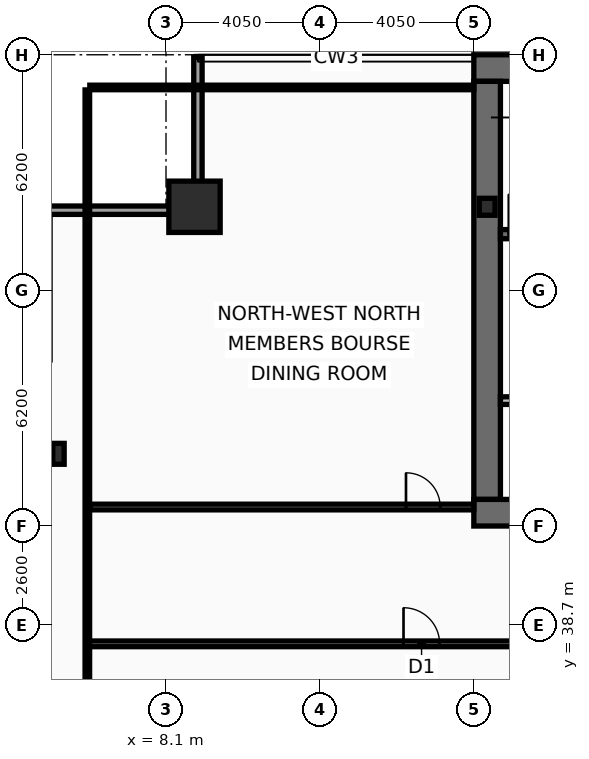
"""IFC4 building model, lengths in metres.
Left out: names, types, materials, properties, quantities, classifications, styles, units other than length and angle.
Written with IfcOpenShell. Run it as: python <this file> out.ifc"""

import sys

from ifc_helpers import new_model, si_unit, direction, frame, frame_2d, origin, origin_2d, place, context, subcontext, project, spatial, rectangle, hollow_rectangle, i_section, extrude, element, fill, save


model = new_model("IFC4")
c1 = context("Model", 3, precision=1e-05, world=origin(), true_north=direction((0.0, 1.0)))
c2 = subcontext(c1, "Body", "Model", "MODEL_VIEW")
j1 = project(units=[si_unit("LENGTHUNIT", "METRE"), si_unit("PLANEANGLEUNIT", "RADIAN")], contexts=[c1])
p1 = place(None, origin())
s1 = spatial("IfcSite", under=j1, at=p1, CompositionType="ELEMENT")
p2 = place(p1, origin())
s2 = spatial("IfcBuilding", under=s1, at=p2, CompositionType="ELEMENT")
p3 = place(p2, frame((0.0, 0.0, 168.6)))
s3 = spatial("IfcBuildingStorey", under=s2, at=p3, CompositionType="ELEMENT", Elevation=168.6)
p4 = place(p3, frame((16.2, 53.35, 0.0), z_axis=(0.0, 0.0, 1.0), x_axis=(1.0, 0.0, 0.0)))
e1 = element("IfcWall", 1, at=p4, inside=s3, PredefinedType="SHEAR", context=c2, shape_type="SweptSolid", body=[
    extrude(rectangle(XDim=40.5, YDim=0.7, at=frame_2d((20.25, 0.0))), origin(), (0.0, 0.0, 1.0), 3.38),
])
p5 = place(p3, frame((16.55, 42.0, 0.0), z_axis=(0.0, 0.0, 1.0), x_axis=(0.0, 1.0, 0.0)))
e2 = element("IfcWall", 2, at=p5, inside=s3, PredefinedType="SHEAR", context=c2, shape_type="SweptSolid", body=[
    extrude(rectangle(XDim=11.0, YDim=0.7, at=frame_2d((5.5, 0.0))), origin(), (0.0, 0.0, 1.0), 3.38),
])
p6 = place(p3, frame((18.65, 41.65, 0.0), z_axis=(0.0, 0.0, 1.0), x_axis=(-1.0, 0.0, 0.0)))
e3 = element("IfcWall", 3, at=p6, inside=s3, PredefinedType="SHEAR", context=c2, shape_type="SweptSolid", body=[
    extrude(rectangle(XDim=2.45, YDim=0.7, at=frame_2d((1.225, 0.0))), origin(), (0.0, 0.0, 1.0), 3.38),
])
p7 = place(p3, frame((16.9, 48.98, 0.0), z_axis=(0.0, 0.0, 1.0), x_axis=(1.0, 0.0, 0.0)))
e4 = element("IfcWall", 4, at=p7, inside=s3, PredefinedType="SHEAR", context=c2, shape_type="SweptSolid", body=[
    extrude(rectangle(XDim=7.32, YDim=0.24, at=frame_2d((3.66, 0.0))), origin(), (0.0, 0.0, 1.0), 3.38),
])
p8 = place(p7, frame((0.22, 0.0, 0.0)))
e5 = element("IfcOpeningElement", 5, at=p8, cuts=e4, PredefinedType="OPENING", context=c2, shape_type="SweptSolid", body=[
    extrude(rectangle(XDim=1.05, YDim=2.15, at=frame_2d((0.525, 1.075))), frame((0.0, 0.13, 0.0), z_axis=(0.0, -1.0, 0.0), x_axis=(1.0, 0.0, 0.0)), (0.0, 0.0, 1.0), 0.26),
])
p9 = place(p3, frame((8.85, 49.7, 0.0), z_axis=(0.0, 0.0, 1.0), x_axis=(1.0, 0.0, 0.0)))
e6 = element("IfcColumn", 6, at=p9, inside=s3, PredefinedType="COLUMN", context=c2, shape_type="SweptSolid", body=[
    extrude(hollow_rectangle(XDim=1.35, YDim=1.35, WallThickness=0.065, at=origin_2d()), origin(), (0.0, 0.0, 1.0), 3.6),
])
p10 = place(p3, frame((5.27, 43.2, 0.0), z_axis=(0.0, 0.0, 1.0), x_axis=(1.0, 0.0, 0.0)))
e7 = element("IfcColumn", 7, at=p10, inside=s3, PredefinedType="COLUMN", context=c2, shape_type="SweptSolid", body=[
    extrude(i_section(OverallWidth=0.3, OverallDepth=0.55, WebThickness=0.015, FlangeThickness=0.029, at=origin_2d()), origin(), (0.0, 0.0, 1.0), 3.6),
])
p11 = place(p3, frame((16.55, 49.7, 0.0), z_axis=(0.0, 0.0, 1.0), x_axis=(1.0, 0.0, 0.0)))
e8 = element("IfcColumn", 8, at=p11, inside=s3, PredefinedType="COLUMN", context=c2, shape_type="SweptSolid", body=[
    extrude(i_section(OverallWidth=0.416, OverallDepth=0.446, WebThickness=0.039, FlangeThickness=0.063, at=origin_2d()), origin(), (0.0, 0.0, 1.0), 3.6),
])
p12 = place(p3, frame((4.83, 49.61, 0.0), z_axis=(0.0, 0.0, 1.0), x_axis=(1.0, 0.0, 0.0)))
e9 = element("IfcWall", 9, at=p12, inside=s3, PredefinedType="SOLIDWALL", context=c2, shape_type="SweptSolid", body=[
    extrude(rectangle(XDim=4.22, YDim=0.22, at=frame_2d((2.11, 0.0))), origin(), (0.0, 0.0, 1.0), 2.77),
])
p13 = place(p3, frame((8.94, 49.72, 0.0), z_axis=(0.0, 0.0, 1.0), x_axis=(0.0, 1.0, 0.0)))
e10 = element("IfcWall", 10, at=p13, inside=s3, PredefinedType="SOLIDWALL", context=c2, shape_type="SweptSolid", body=[
    extrude(rectangle(XDim=3.91, YDim=0.22, at=frame_2d((1.955, 0.0))), origin(), (0.0, 0.0, 1.0), 2.77),
])
p14 = place(p3, frame((16.9, 44.6, 0.0), z_axis=(0.0, 0.0, 1.0), x_axis=(1.0, 0.0, 0.0)))
e11 = element("IfcWall", 11, at=p14, inside=s3, PredefinedType="PARTITIONING", context=c2, shape_type="SweptSolid", body=[
    extrude(rectangle(XDim=4.1, YDim=0.2, at=frame_2d((2.05, 0.0))), origin(), (0.0, 0.0, 1.0), 3.38),
])
p15 = place(p14, frame((1.25, 0.0, 0.0)))
e12 = element("IfcOpeningElement", 12, at=p15, cuts=e11, PredefinedType="OPENING", context=c2, shape_type="SweptSolid", body=[
    extrude(rectangle(XDim=1.05, YDim=2.15, at=frame_2d((0.525, 1.075))), frame((0.0, 0.11, 0.0), z_axis=(0.0, -1.0, 0.0), x_axis=(1.0, 0.0, 0.0)), (0.0, 0.0, 1.0), 0.22),
])
p16 = place(p3, frame((6.03, 38.2, 0.0), z_axis=(0.0, 0.0, 1.0), x_axis=(1.0, 0.0, 0.0)))
e13 = element("IfcWall", 13, at=p16, inside=s3, PredefinedType="PARTITIONING", context=c2, shape_type="SweptSolid", body=[
    extrude(rectangle(XDim=12.52, YDim=0.15, at=frame_2d((6.26, 0.0))), origin(), (0.0, 0.0, 1.0), 2.67),
])
p17 = place(p16, frame((8.32, 0.0, 0.0)))
e14 = element("IfcOpeningElement", 14, at=p17, cuts=e13, PredefinedType="OPENING", context=c2, shape_type="SweptSolid", body=[
    extrude(rectangle(XDim=0.95, YDim=2.05, at=frame_2d((0.475, 1.025))), frame((0.0, 0.085, 0.0), z_axis=(0.0, -1.0, 0.0), x_axis=(1.0, 0.0, 0.0)), (0.0, 0.0, 1.0), 0.17),
])
p18 = place(p3, frame((6.095, 41.8, 0.0), z_axis=(0.0, 0.0, 1.0), x_axis=(1.0, 0.0, 0.0)))
e15 = element("IfcWall", 15, at=p18, inside=s3, PredefinedType="PARTITIONING", context=c2, shape_type="SweptSolid", body=[
    extrude(rectangle(XDim=10.105, YDim=0.15, at=frame_2d((5.052, 0.0))), origin(), (0.0, 0.0, 1.0), 3.38),
])
p19 = place(p18, frame((8.32, 0.0, 0.0)))
e16 = element("IfcOpeningElement", 16, at=p19, cuts=e15, PredefinedType="OPENING", context=c2, shape_type="SweptSolid", body=[
    extrude(rectangle(XDim=0.9, YDim=2.05, at=frame_2d((0.45, 1.025))), frame((0.0, 0.085, 0.0), z_axis=(0.0, -1.0, 0.0), x_axis=(1.0, 0.0, 0.0)), (0.0, 0.0, 1.0), 0.17),
])
p20 = place(p3, frame((6.03, 10.665, 0.0), z_axis=(0.0, 0.0, 1.0), x_axis=(0.0, 1.0, 0.0)))
e17 = element("IfcWall", 17, at=p20, inside=s3, PredefinedType="PARTITIONING", context=c2, shape_type="SweptSolid", body=[
    extrude(rectangle(XDim=42.11, YDim=0.12, at=frame_2d((21.055, 0.0))), origin(), (0.0, 0.0, 1.0), 2.67),
])
p21 = place(p3, frame((6.095, 52.84, 0.0), z_axis=(0.0, 0.0, 1.0), x_axis=(1.0, 0.0, 0.0)))
e18 = element("IfcWall", 18, at=p21, inside=s3, PredefinedType="PARTITIONING", context=c2, shape_type="SweptSolid", body=[
    extrude(rectangle(XDim=10.105, YDim=0.12, at=frame_2d((5.052, 0.0))), origin(), (0.0, 0.0, 1.0), 3.38),
])
p22 = place(p8, origin())
e19 = element("IfcDoor", 19, at=p22, inside=s3, OperationType="SINGLE_SWING_LEFT", PredefinedType="DOOR", context=c2, shape_type="SweptSolid", body=[
    extrude(rectangle(XDim=1.05, YDim=2.15, at=frame_2d((0.525, 1.075))), frame((0.0, 0.025, 0.0), z_axis=(0.0, -1.0, 0.0), x_axis=(1.0, 0.0, 0.0)), (0.0, 0.0, 1.0), 0.05),
])
fill(e5, e19)
p23 = place(p17, origin())
e20 = element("IfcDoor", 20, at=p23, inside=s3, OperationType="SINGLE_SWING_LEFT", PredefinedType="DOOR", context=c2, shape_type="SweptSolid", body=[
    extrude(rectangle(XDim=0.95, YDim=2.05, at=frame_2d((0.475, 1.025))), frame((0.0, 0.025, 0.0), z_axis=(0.0, -1.0, 0.0), x_axis=(1.0, 0.0, 0.0)), (0.0, 0.0, 1.0), 0.05),
])
fill(e14, e20)
p24 = place(p19, origin())
e21 = element("IfcDoor", 21, at=p24, inside=s3, OperationType="SINGLE_SWING_LEFT", PredefinedType="DOOR", context=c2, shape_type="SweptSolid", body=[
    extrude(rectangle(XDim=0.9, YDim=2.05, at=frame_2d((0.45, 1.025))), frame((0.0, 0.025, 0.0), z_axis=(0.0, -1.0, 0.0), x_axis=(1.0, 0.0, 0.0)), (0.0, 0.0, 1.0), 0.05),
])
fill(e16, e21)
save(model, sys.argv[1])
